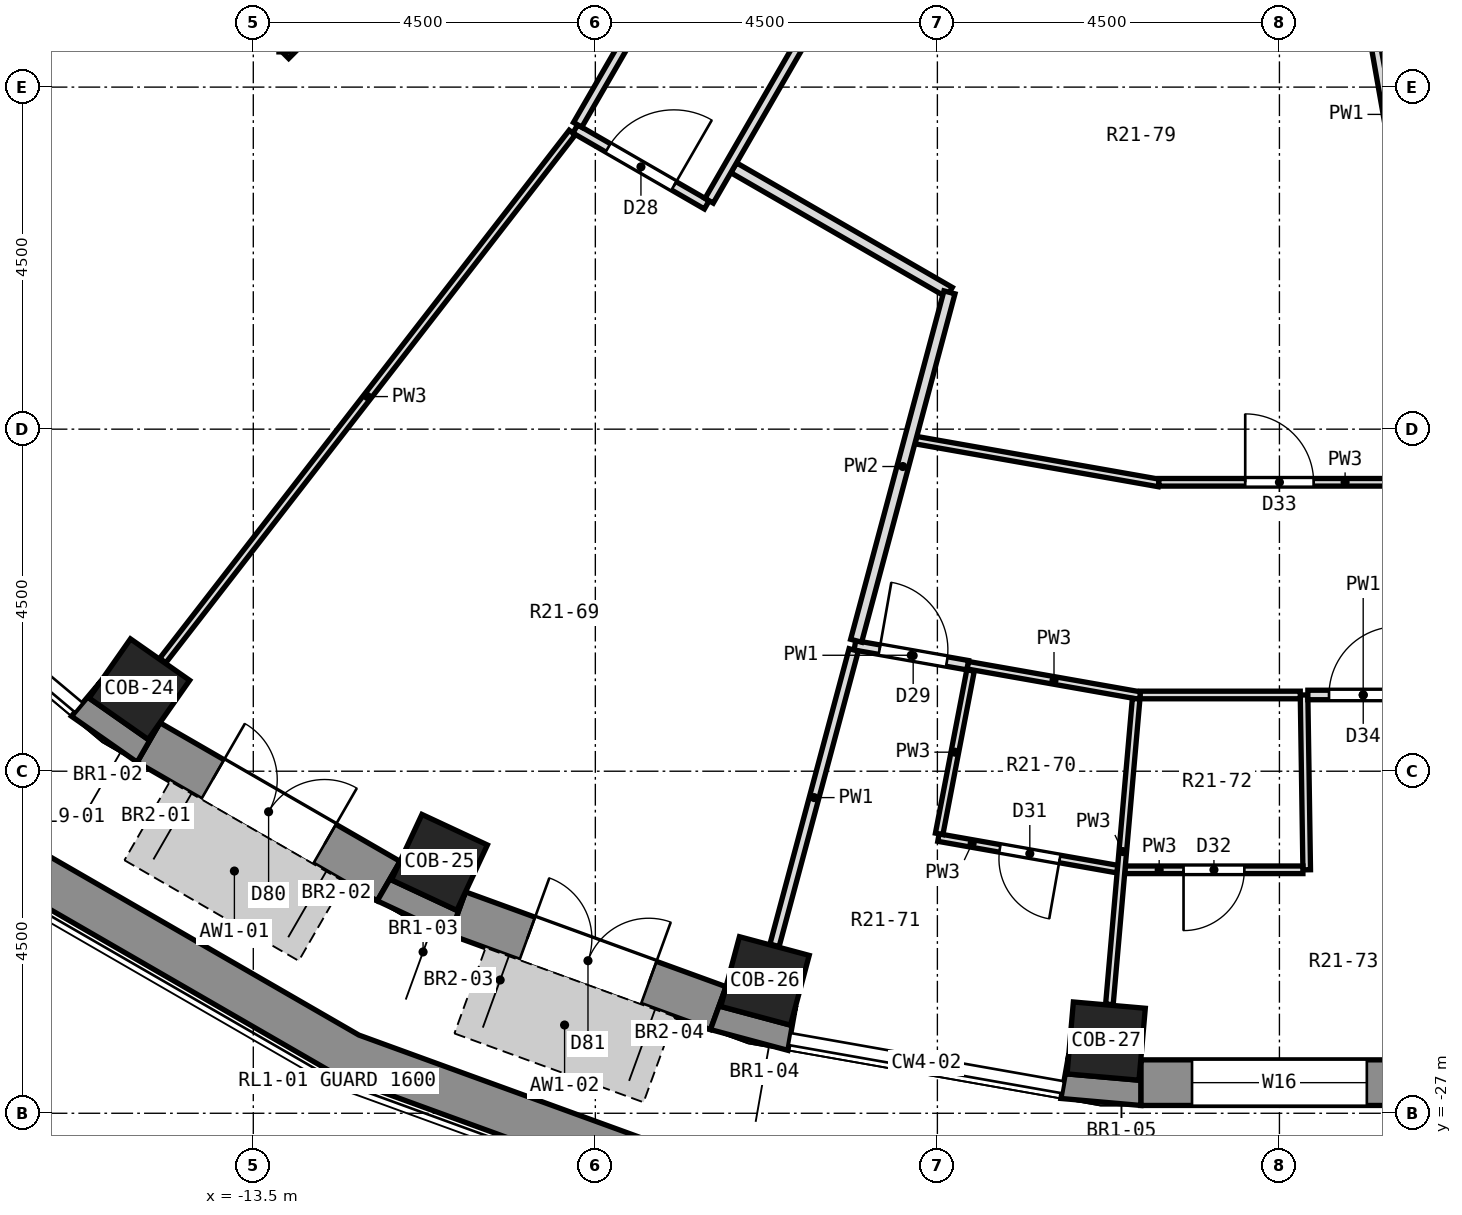
"""IFC4 building model, lengths in metres.
Left out: names, types, materials, properties, quantities, classifications, styles, units other than length and angle.
Written with IfcOpenShell. Run it as: python <this file> out.ifc"""

import sys

from ifc_helpers import new_model, si_unit, direction, frame, frame_2d, origin, origin_2d, place, context, subcontext, project, spatial, polyline, rectangle, outline, extrude, element, fill, save


model = new_model("IFC4")
c1 = context("Model", 3, precision=1e-05, world=origin(), true_north=direction((0.0, 1.0)))
c2 = subcontext(c1, "Body", "Model", "MODEL_VIEW")
j1 = project(units=[si_unit("LENGTHUNIT", "METRE"), si_unit("PLANEANGLEUNIT", "RADIAN")], contexts=[c1])
p1 = place(None, origin())
s1 = spatial("IfcSite", under=j1, at=p1, CompositionType="ELEMENT")
p2 = place(p1, origin())
s2 = spatial("IfcBuilding", under=s1, at=p2, CompositionType="ELEMENT")
p3 = place(p2, frame((0.0, 0.0, 131.5)))
s3 = spatial("IfcBuildingStorey", under=s2, at=p3, CompositionType="ELEMENT", Elevation=131.5)
for number, where, z_axis, x_axis in (
    (1, (-14.999, -21.421, 0.0), (0.0, 0.0, 1.0), (-0.574, -0.819, 0.0)),
    (2, (-11.052, -23.7, 0.0), (0.0, 0.0, 1.0), (-0.423, -0.906, 0.0)),
    (3, (-6.768, -25.259, 0.0), (0.0, 0.0, 1.0), (-0.259, -0.966, 0.0)),
    (4, (-2.279, -26.051, 0.0), (0.0, 0.0, 1.0), (-0.087, -0.996, 0.0)),
):
    element("IfcColumn", number, at=place(p3, frame(where, z_axis=z_axis, x_axis=x_axis)), inside=s3, PredefinedType="COLUMN", context=c2, shape_type="SweptSolid", body=[
        extrude(rectangle(XDim=0.95, YDim=0.95, at=origin_2d()), origin(), (0.0, 0.0, 1.0), 3.3),
    ])
p4 = place(p3, frame((-14.878, -22.122, 0.0), z_axis=(0.0, 0.0, 1.0), x_axis=(0.866051847062, -0.499954196102, 0.0)))
e5 = element("IfcWall", 5, at=p4, inside=s3, PredefinedType="SOLIDWALL", context=c2, shape_type="SweptSolid", body=[
    extrude(rectangle(XDim=3.648, YDim=0.6, at=frame_2d((1.824, 0.0))), origin(), (0.0, 0.0, 1.0), 2.8),
])
p5 = place(p4, frame((0.974, 0.0, 0.0)))
e6 = element("IfcOpeningElement", 6, at=p5, cuts=e5, PredefinedType="OPENING", context=c2, shape_type="SweptSolid", body=[
    extrude(rectangle(XDim=1.7, YDim=2.4, at=frame_2d((0.85, 1.2))), frame((0.0, 0.312, 0.0), z_axis=(0.0, -1.0, 0.0), x_axis=(1.0, 0.0, 0.0)), (0.0, 0.0, 1.0), 0.624),
])
p6 = place(p3, frame((-10.811, -24.369, 0.0), z_axis=(0.0, 0.0, 1.0), x_axis=(0.939703505393, -0.341990236633, 0.0)))
e7 = element("IfcWall", 7, at=p6, inside=s3, PredefinedType="SOLIDWALL", context=c2, shape_type="SweptSolid", body=[
    extrude(rectangle(XDim=3.648, YDim=0.6, at=frame_2d((1.824, 0.0))), origin(), (0.0, 0.0, 1.0), 2.8),
])
p7 = place(p6, frame((0.974, 0.0, 0.0)))
e8 = element("IfcOpeningElement", 8, at=p7, cuts=e7, PredefinedType="OPENING", context=c2, shape_type="SweptSolid", body=[
    extrude(rectangle(XDim=1.7, YDim=2.4, at=frame_2d((0.85, 1.2))), frame((0.0, 0.312, 0.0), z_axis=(0.0, -1.0, 0.0), x_axis=(1.0, 0.0, 0.0)), (0.0, 0.0, 1.0), 0.624),
])
p8 = place(p3, frame((-1.824, -26.597, 0.0), z_axis=(0.0, 0.0, 1.0), x_axis=(1.0, 0.0, 0.0)))
e9 = element("IfcWall", 9, at=p8, inside=s3, PredefinedType="SOLIDWALL", context=c2, shape_type="SweptSolid", body=[
    extrude(rectangle(XDim=3.648, YDim=0.6, at=frame_2d((1.824, 0.0))), origin(), (0.0, 0.0, 1.0), 2.8),
])
p9 = place(p8, frame((0.674, 0.0, 0.9)))
e10 = element("IfcOpeningElement", 10, at=p9, cuts=e9, PredefinedType="OPENING", context=c2, shape_type="SweptSolid", body=[
    extrude(rectangle(XDim=2.3, YDim=1.8, at=frame_2d((1.15, 0.9))), frame((0.0, 0.312, 0.0), z_axis=(0.0, -1.0, 0.0), x_axis=(1.0, 0.0, 0.0)), (0.0, 0.0, 1.0), 0.624),
])
p10 = place(p3, origin())
e11 = element("IfcWall", 11, at=p10, inside=s3, PredefinedType="SOLIDWALL", context=c2, shape_type="SweptSolid", body=[
    extrude(outline(polyline([(-15.028, -22.382), (-14.728, -21.862), (-14.882, -22.083), (-15.661, -21.538), (-15.506, -21.317), (-15.892, -21.777), (-15.028, -22.382)])), origin(), (0.0, 0.0, 1.0), 2.8),
])
p11 = place(p3, origin())
e12 = element("IfcWall", 12, at=p11, inside=s3, PredefinedType="SOLIDWALL", context=c2, shape_type="SweptSolid", body=[
    extrude(outline(polyline([(-10.913, -24.651), (-10.708, -24.087), (-10.822, -24.331), (-11.683, -23.93), (-11.569, -23.686), (-11.869, -24.206), (-10.913, -24.651)])), origin(), (0.0, 0.0, 1.0), 2.8),
])
p12 = place(p3, origin())
e13 = element("IfcWall", 13, at=p12, inside=s3, PredefinedType="SOLIDWALL", context=c2, shape_type="SweptSolid", body=[
    extrude(outline(polyline([(-7.486, -25.899), (-6.467, -26.172), (-6.363, -25.581), (-6.432, -25.841), (-7.35, -25.595), (-7.28, -25.335), (-7.486, -25.899)])), origin(), (0.0, 0.0, 1.0), 2.8),
])
p13 = place(p3, origin())
e14 = element("IfcWall", 14, at=p13, inside=s3, PredefinedType="SOLIDWALL", context=c2, shape_type="SweptSolid", body=[
    extrude(outline(polyline([(-2.875, -26.805), (-1.824, -26.897), (-1.824, -26.297), (-1.847, -26.565), (-2.794, -26.482), (-2.77, -26.215), (-2.875, -26.805)])), origin(), (0.0, 0.0, 1.0), 2.8),
])
p14 = place(p3, origin())
e15 = element("IfcWall", 15, at=p14, inside=s3, PredefinedType="PARAPET", context=c2, shape_type="SweptSolid", body=[
    extrude(outline(polyline([(-16.782, -23.967), (-12.365, -26.517), (-7.573, -28.262), (-7.417, -27.68), (-12.111, -25.971), (-16.437, -23.474), (-16.782, -23.967)])), origin(), (0.0, 0.0, 1.0), 0.5),
])
p15 = place(p3, frame((0.324, -21.497, 0.0), z_axis=(0.0, 0.0, 1.0), x_axis=(0.015177107463, -0.999884821071, 0.0)))
e16 = element("IfcWall", 16, at=p15, inside=s3, PredefinedType="PARTITIONING", context=c2, shape_type="SweptSolid", body=[
    extrude(rectangle(XDim=2.3, YDim=0.1, at=frame_2d((1.15, 0.0))), origin(), (0.0, 0.0, 1.0), 2.8),
])
p16 = place(p3, frame((0.924, -11.0, 0.0), z_axis=(0.0, 0.0, 1.0), x_axis=(0.173576639114, -0.98482036451, 0.0)))
e17 = element("IfcWall", 17, at=p16, inside=s3, PredefinedType="PARTITIONING", context=c2, shape_type="SweptSolid", body=[
    extrude(rectangle(XDim=5.806, YDim=0.125, at=frame_2d((2.903, 0.0))), origin(), (0.0, 0.0, 1.0), 2.8),
])
p17 = place(p3, frame((-9.264, -14.05, 0.0), z_axis=(0.0, 0.0, 1.0), x_axis=(0.866008543052, -0.500029202507, 0.0)))
e18 = element("IfcWall", 18, at=p17, inside=s3, PredefinedType="PARTITIONING", context=c2, shape_type="SweptSolid", body=[
    extrude(rectangle(XDim=1.998, YDim=0.125, at=frame_2d((0.999, 0.0))), origin(), (0.0, 0.0, 1.0), 2.8),
])
p18 = place(p17, frame((0.498, 0.0, 0.0)))
e19 = element("IfcOpeningElement", 19, at=p18, cuts=e18, PredefinedType="OPENING", context=c2, shape_type="SweptSolid", body=[
    extrude(rectangle(XDim=1.0, YDim=2.1, at=frame_2d((0.5, 1.05))), frame((0.0, 0.074, 0.0), z_axis=(0.0, -1.0, 0.0), x_axis=(1.0, 0.0, 0.0)), (0.0, 0.0, 1.0), 0.149),
])
p19 = place(p3, frame((-7.18, -14.561, 0.0), z_axis=(0.0, 0.0, 1.0), x_axis=(0.866071485186, -0.499920176176, 0.0)))
e20 = element("IfcWall", 20, at=p19, inside=s3, PredefinedType="PARTITIONING", context=c2, shape_type="SweptSolid", body=[
    extrude(rectangle(XDim=3.278, YDim=0.15, at=frame_2d((1.639, 0.0))), origin(), (0.0, 0.0, 1.0), 2.8),
])
p20 = place(p3, frame((-4.486, -23.373, 0.0), z_axis=(0.0, 0.0, 1.0), x_axis=(0.984802055472, -0.173680486922, 0.0)))
e21 = element("IfcWall", 21, at=p20, inside=s3, PredefinedType="PARTITIONING", context=c2, shape_type="SweptSolid", body=[
    extrude(rectangle(XDim=2.391, YDim=0.1, at=frame_2d((1.196, 0.0))), origin(), (0.0, 0.0, 1.0), 2.8),
])
p21 = place(p20, frame((0.821, 0.0, 0.0)))
e22 = element("IfcOpeningElement", 22, at=p21, cuts=e21, PredefinedType="OPENING", context=c2, shape_type="SweptSolid", body=[
    extrude(rectangle(XDim=0.8, YDim=2.1, at=frame_2d((0.4, 1.05))), frame((0.0, 0.062, 0.0), z_axis=(0.0, -1.0, 0.0), x_axis=(1.0, 0.0, 0.0)), (0.0, 0.0, 1.0), 0.124),
])
p22 = place(p3, frame((-4.101, -21.105, 0.0), z_axis=(0.0, 0.0, 1.0), x_axis=(0.984783558818, -0.173785333909, 0.0)))
e23 = element("IfcWall", 23, at=p22, inside=s3, PredefinedType="PARTITIONING", context=c2, shape_type="SweptSolid", body=[
    extrude(rectangle(XDim=2.305, YDim=0.1, at=frame_2d((1.153, 0.0))), origin(), (0.0, 0.0, 1.0), 2.8),
])
p23 = place(p3, frame((-5.585, -20.844, 0.0), z_axis=(0.0, 0.0, 1.0), x_axis=(0.984850377204, -0.173406270135, 0.0)))
e24 = element("IfcWall", 24, at=p23, inside=s3, PredefinedType="PARTITIONING", context=c2, shape_type="SweptSolid", body=[
    extrude(rectangle(XDim=1.506, YDim=0.125, at=frame_2d((0.753, 0.0))), origin(), (0.0, 0.0, 1.0), 2.8),
])
p24 = place(p23, frame((0.328, 0.0, 0.0)))
e25 = element("IfcOpeningElement", 25, at=p24, cuts=e24, PredefinedType="OPENING", context=c2, shape_type="SweptSolid", body=[
    extrude(rectangle(XDim=0.9, YDim=2.1, at=frame_2d((0.45, 1.05))), frame((0.0, 0.074, 0.0), z_axis=(0.0, -1.0, 0.0), x_axis=(1.0, 0.0, 0.0)), (0.0, 0.0, 1.0), 0.149),
])
p25 = place(p3, frame((-4.784, -18.144, 0.0), z_axis=(0.0, 0.0, 1.0), x_axis=(0.98481910853, -0.173583765007, 0.0)))
e26 = element("IfcWall", 26, at=p25, inside=s3, PredefinedType="PARTITIONING", context=c2, shape_type="SweptSolid", body=[
    extrude(rectangle(XDim=3.248, YDim=0.1, at=frame_2d((1.624, 0.0))), origin(), (0.0, 0.0, 1.0), 2.8),
])
p26 = place(p3, frame((-2.032, -23.797, 0.0), z_axis=(0.0, 0.0, 1.0), x_axis=(1.0, 0.0, 0.0)))
e27 = element("IfcWall", 27, at=p26, inside=s3, PredefinedType="PARTITIONING", context=c2, shape_type="SweptSolid", body=[
    extrude(rectangle(XDim=2.341, YDim=0.1, at=frame_2d((1.17, 0.0))), origin(), (0.0, 0.0, 1.0), 2.8),
])
p27 = place(p26, frame((0.771, 0.0, 0.0)))
e28 = element("IfcOpeningElement", 28, at=p27, cuts=e27, PredefinedType="OPENING", context=c2, shape_type="SweptSolid", body=[
    extrude(rectangle(XDim=0.8, YDim=2.1, at=frame_2d((0.4, 1.05))), frame((0.0, 0.062, 0.0), z_axis=(0.0, -1.0, 0.0), x_axis=(1.0, 0.0, 0.0)), (0.0, 0.0, 1.0), 0.124),
])
p28 = place(p3, frame((-1.831, -21.497, 0.0), z_axis=(0.0, 0.0, 1.0), x_axis=(1.0, 0.0, 0.0)))
e29 = element("IfcWall", 29, at=p28, inside=s3, PredefinedType="PARTITIONING", context=c2, shape_type="SweptSolid", body=[
    extrude(rectangle(XDim=2.105, YDim=0.1, at=frame_2d((1.052, 0.0))), origin(), (0.0, 0.0, 1.0), 2.8),
])
p29 = place(p3, frame((0.374, -21.497, 0.0), z_axis=(0.0, 0.0, 1.0), x_axis=(1.0, 0.0, 0.0)))
e30 = element("IfcWall", 30, at=p29, inside=s3, PredefinedType="PARTITIONING", context=c2, shape_type="SweptSolid", body=[
    extrude(rectangle(XDim=1.457, YDim=0.125, at=frame_2d((0.729, 0.0))), origin(), (0.0, 0.0, 1.0), 2.8),
])
p30 = place(p29, frame((0.279, 0.0, 0.0)))
e31 = element("IfcOpeningElement", 31, at=p30, cuts=e30, PredefinedType="OPENING", context=c2, shape_type="SweptSolid", body=[
    extrude(rectangle(XDim=0.9, YDim=2.1, at=frame_2d((0.45, 1.05))), frame((0.0, 0.074, 0.0), z_axis=(0.0, -1.0, 0.0), x_axis=(1.0, 0.0, 0.0)), (0.0, 0.0, 1.0), 0.149),
])
p31 = place(p3, frame((-1.586, -18.699, 0.0), z_axis=(0.0, 0.0, 1.0), x_axis=(1.0, 0.0, 0.0)))
e32 = element("IfcWall", 32, at=p31, inside=s3, PredefinedType="PARTITIONING", context=c2, shape_type="SweptSolid", body=[
    extrude(rectangle(XDim=3.273, YDim=0.1, at=frame_2d((1.636, 0.0))), origin(), (0.0, 0.0, 1.0), 2.8),
])
p32 = place(p31, frame((1.136, 0.0, 0.0)))
e33 = element("IfcOpeningElement", 33, at=p32, cuts=e32, PredefinedType="OPENING", context=c2, shape_type="SweptSolid", body=[
    extrude(rectangle(XDim=0.9, YDim=2.1, at=frame_2d((0.45, 1.05))), frame((0.0, 0.062, 0.0), z_axis=(0.0, -1.0, 0.0), x_axis=(1.0, 0.0, 0.0)), (0.0, 0.0, 1.0), 0.124),
])
p33 = place(p3, frame((-13.079, -13.079, 0.0), z_axis=(0.0, 0.0, 1.0), x_axis=(0.707106781187, 0.707106781187, 0.0)))
e34 = element("IfcWall", 34, at=p33, inside=s3, PredefinedType="PARTITIONING", context=c2, shape_type="SweptSolid", body=[
    extrude(rectangle(XDim=4.176, YDim=0.125, at=frame_2d((2.088, 0.0))), origin(), (0.0, 0.0, 1.0), 2.8),
])
p34 = place(p33, frame((1.654, 0.0, 0.0)))
e35 = element("IfcOpeningElement", 35, at=p34, cuts=e34, PredefinedType="OPENING", context=c2, shape_type="SweptSolid", body=[
    extrude(rectangle(XDim=0.9, YDim=2.1, at=frame_2d((0.45, 1.05))), frame((0.0, 0.074, 0.0), z_axis=(0.0, -1.0, 0.0), x_axis=(1.0, 0.0, 0.0)), (0.0, 0.0, 1.0), 0.149),
])
p35 = place(p3, frame((-14.691, -21.044, 0.0), z_axis=(0.0, 0.0, 1.0), x_axis=(0.612857497435, 0.79019344963, 0.0)))
e36 = element("IfcWall", 36, at=p35, inside=s3, PredefinedType="PARTITIONING", context=c2, shape_type="SweptSolid", body=[
    extrude(rectangle(XDim=8.79, YDim=0.1, at=frame_2d((4.395, 0.0))), origin(), (0.0, 0.0, 1.0), 2.8),
])
p36 = place(p3, frame((-7.503, -14.995, 0.0), z_axis=(0.0, 0.0, 1.0), x_axis=(0.500436522094, 0.865773230907, 0.0)))
e37 = element("IfcWall", 37, at=p36, inside=s3, PredefinedType="PARTITIONING", context=c2, shape_type="SweptSolid", body=[
    extrude(rectangle(XDim=5.682, YDim=0.125, at=frame_2d((2.841, 0.0))), origin(), (0.0, 0.0, 1.0), 2.8),
])
p37 = place(p3, frame((-9.233, -13.996, 0.0), z_axis=(0.0, 0.0, 1.0), x_axis=(0.500439738106, 0.865771371971, 0.0)))
e38 = element("IfcWall", 38, at=p37, inside=s3, PredefinedType="PARTITIONING", context=c2, shape_type="SweptSolid", body=[
    extrude(rectangle(XDim=5.744, YDim=0.125, at=frame_2d((2.872, 0.0))), origin(), (0.0, 0.0, 1.0), 2.8),
])
p38 = place(p3, frame((-6.642, -24.791, 0.0), z_axis=(0.0, 0.0, 1.0), x_axis=(0.258806858621, 0.965929091565, 0.0)))
e39 = element("IfcWall", 39, at=p38, inside=s3, PredefinedType="PARTITIONING", context=c2, shape_type="SweptSolid", body=[
    extrude(rectangle(XDim=4.023, YDim=0.125, at=frame_2d((2.012, 0.0))), origin(), (0.0, 0.0, 1.0), 2.8),
])
p39 = place(p3, frame((-5.569, -20.784, 0.0), z_axis=(0.0, 0.0, 1.0), x_axis=(0.258735228002, 0.965948281116, 0.0)))
e40 = element("IfcWall", 40, at=p39, inside=s3, PredefinedType="PARTITIONING", context=c2, shape_type="SweptSolid", body=[
    extrude(rectangle(XDim=4.745, YDim=0.15, at=frame_2d((2.373, 0.0))), origin(), (0.0, 0.0, 1.0), 2.8),
])
p40 = place(p3, frame((-4.477, -23.324, 0.0), z_axis=(0.0, 0.0, 1.0), x_axis=(0.188685986474, 0.982037473067, 0.0)))
e41 = element("IfcWall", 41, at=p40, inside=s3, PredefinedType="PARTITIONING", context=c2, shape_type="SweptSolid", body=[
    extrude(rectangle(XDim=2.188, YDim=0.1, at=frame_2d((1.094, 0.0))), origin(), (0.0, 0.0, 1.0), 2.8),
])
p41 = place(p3, frame((-2.237, -25.567, 0.0), z_axis=(0.0, 0.0, 1.0), x_axis=(0.087169951933, 0.996193454847, 0.0)))
e42 = element("IfcWall", 42, at=p41, inside=s3, PredefinedType="PARTITIONING", context=c2, shape_type="SweptSolid", body=[
    extrude(rectangle(XDim=4.036, YDim=0.1, at=frame_2d((2.018, 0.0))), origin(), (0.0, 0.0, 1.0), 2.8),
])
p42 = place(p5, origin())
e43 = element("IfcDoor", 43, at=p42, inside=s3, OperationType="DOUBLE_DOOR_SINGLE_SWING", PredefinedType="DOOR", context=c2, shape_type="SweptSolid", body=[
    extrude(rectangle(XDim=1.7, YDim=2.4, at=frame_2d((0.85, 1.2))), frame((0.0, 0.125, 0.0), z_axis=(0.0, -1.0, 0.0), x_axis=(1.0, 0.0, 0.0)), (0.0, 0.0, 1.0), 0.05),
])
fill(e6, e43)
p43 = place(p7, origin())
e44 = element("IfcDoor", 44, at=p43, inside=s3, OperationType="DOUBLE_DOOR_SINGLE_SWING", PredefinedType="DOOR", context=c2, shape_type="SweptSolid", body=[
    extrude(rectangle(XDim=1.7, YDim=2.4, at=frame_2d((0.85, 1.2))), frame((0.0, 0.125, 0.0), z_axis=(0.0, -1.0, 0.0), x_axis=(1.0, 0.0, 0.0)), (0.0, 0.0, 1.0), 0.05),
])
fill(e8, e44)
p44 = place(p9, origin())
e45 = element("IfcWindow", 45, at=p44, inside=s3, PartitioningType="SINGLE_PANEL", PredefinedType="WINDOW", context=c2, shape_type="SweptSolid", body=[
    extrude(rectangle(XDim=2.3, YDim=1.8, at=frame_2d((1.15, 0.9))), frame((0.0, 0.18, 0.0), z_axis=(0.0, -1.0, 0.0), x_axis=(1.0, 0.0, 0.0)), (0.0, 0.0, 1.0), 0.06),
])
fill(e10, e45)
p45 = place(p18, origin())
e46 = element("IfcDoor", 46, at=p45, inside=s3, OperationType="SINGLE_SWING_RIGHT", PredefinedType="DOOR", context=c2, shape_type="SweptSolid", body=[
    extrude(rectangle(XDim=1.0, YDim=2.1, at=frame_2d((0.5, 1.05))), frame((0.0, 0.025, 0.0), z_axis=(0.0, -1.0, 0.0), x_axis=(1.0, 0.0, 0.0)), (0.0, 0.0, 1.0), 0.05),
])
fill(e19, e46)
p46 = place(p24, origin())
e47 = element("IfcDoor", 47, at=p46, inside=s3, OperationType="SINGLE_SWING_LEFT", PredefinedType="DOOR", context=c2, shape_type="SweptSolid", body=[
    extrude(rectangle(XDim=0.9, YDim=2.1, at=frame_2d((0.45, 1.05))), frame((0.0, 0.025, 0.0), z_axis=(0.0, -1.0, 0.0), x_axis=(1.0, 0.0, 0.0)), (0.0, 0.0, 1.0), 0.05),
])
fill(e25, e47)
p47 = place(p21, frame((0.8, 0.0, 0.0), z_axis=(0.0, 0.0, 1.0), x_axis=(-1.0, 0.0, 0.0)))
e48 = element("IfcDoor", 48, at=p47, inside=s3, OperationType="SINGLE_SWING_LEFT", PredefinedType="DOOR", context=c2, shape_type="SweptSolid", body=[
    extrude(rectangle(XDim=0.8, YDim=2.1, at=frame_2d((0.4, 1.05))), frame((0.0, 0.025, 0.0), z_axis=(0.0, -1.0, 0.0), x_axis=(1.0, 0.0, 0.0)), (0.0, 0.0, 1.0), 0.05),
])
fill(e22, e48)
p48 = place(p27, frame((0.8, 0.0, 0.0), z_axis=(0.0, 0.0, 1.0), x_axis=(-1.0, 0.0, 0.0)))
e49 = element("IfcDoor", 49, at=p48, inside=s3, OperationType="SINGLE_SWING_RIGHT", PredefinedType="DOOR", context=c2, shape_type="SweptSolid", body=[
    extrude(rectangle(XDim=0.8, YDim=2.1, at=frame_2d((0.4, 1.05))), frame((0.0, 0.025, 0.0), z_axis=(0.0, -1.0, 0.0), x_axis=(1.0, 0.0, 0.0)), (0.0, 0.0, 1.0), 0.05),
])
fill(e28, e49)
p49 = place(p32, origin())
e50 = element("IfcDoor", 50, at=p49, inside=s3, OperationType="SINGLE_SWING_LEFT", PredefinedType="DOOR", context=c2, shape_type="SweptSolid", body=[
    extrude(rectangle(XDim=0.9, YDim=2.1, at=frame_2d((0.45, 1.05))), frame((0.0, 0.025, 0.0), z_axis=(0.0, -1.0, 0.0), x_axis=(1.0, 0.0, 0.0)), (0.0, 0.0, 1.0), 0.05),
])
fill(e33, e50)
p50 = place(p30, origin())
e51 = element("IfcDoor", 51, at=p50, inside=s3, OperationType="SINGLE_SWING_RIGHT", PredefinedType="DOOR", context=c2, shape_type="SweptSolid", body=[
    extrude(rectangle(XDim=0.9, YDim=2.1, at=frame_2d((0.45, 1.05))), frame((0.0, 0.025, 0.0), z_axis=(0.0, -1.0, 0.0), x_axis=(1.0, 0.0, 0.0)), (0.0, 0.0, 1.0), 0.05),
])
fill(e31, e51)
save(model, sys.argv[1])
